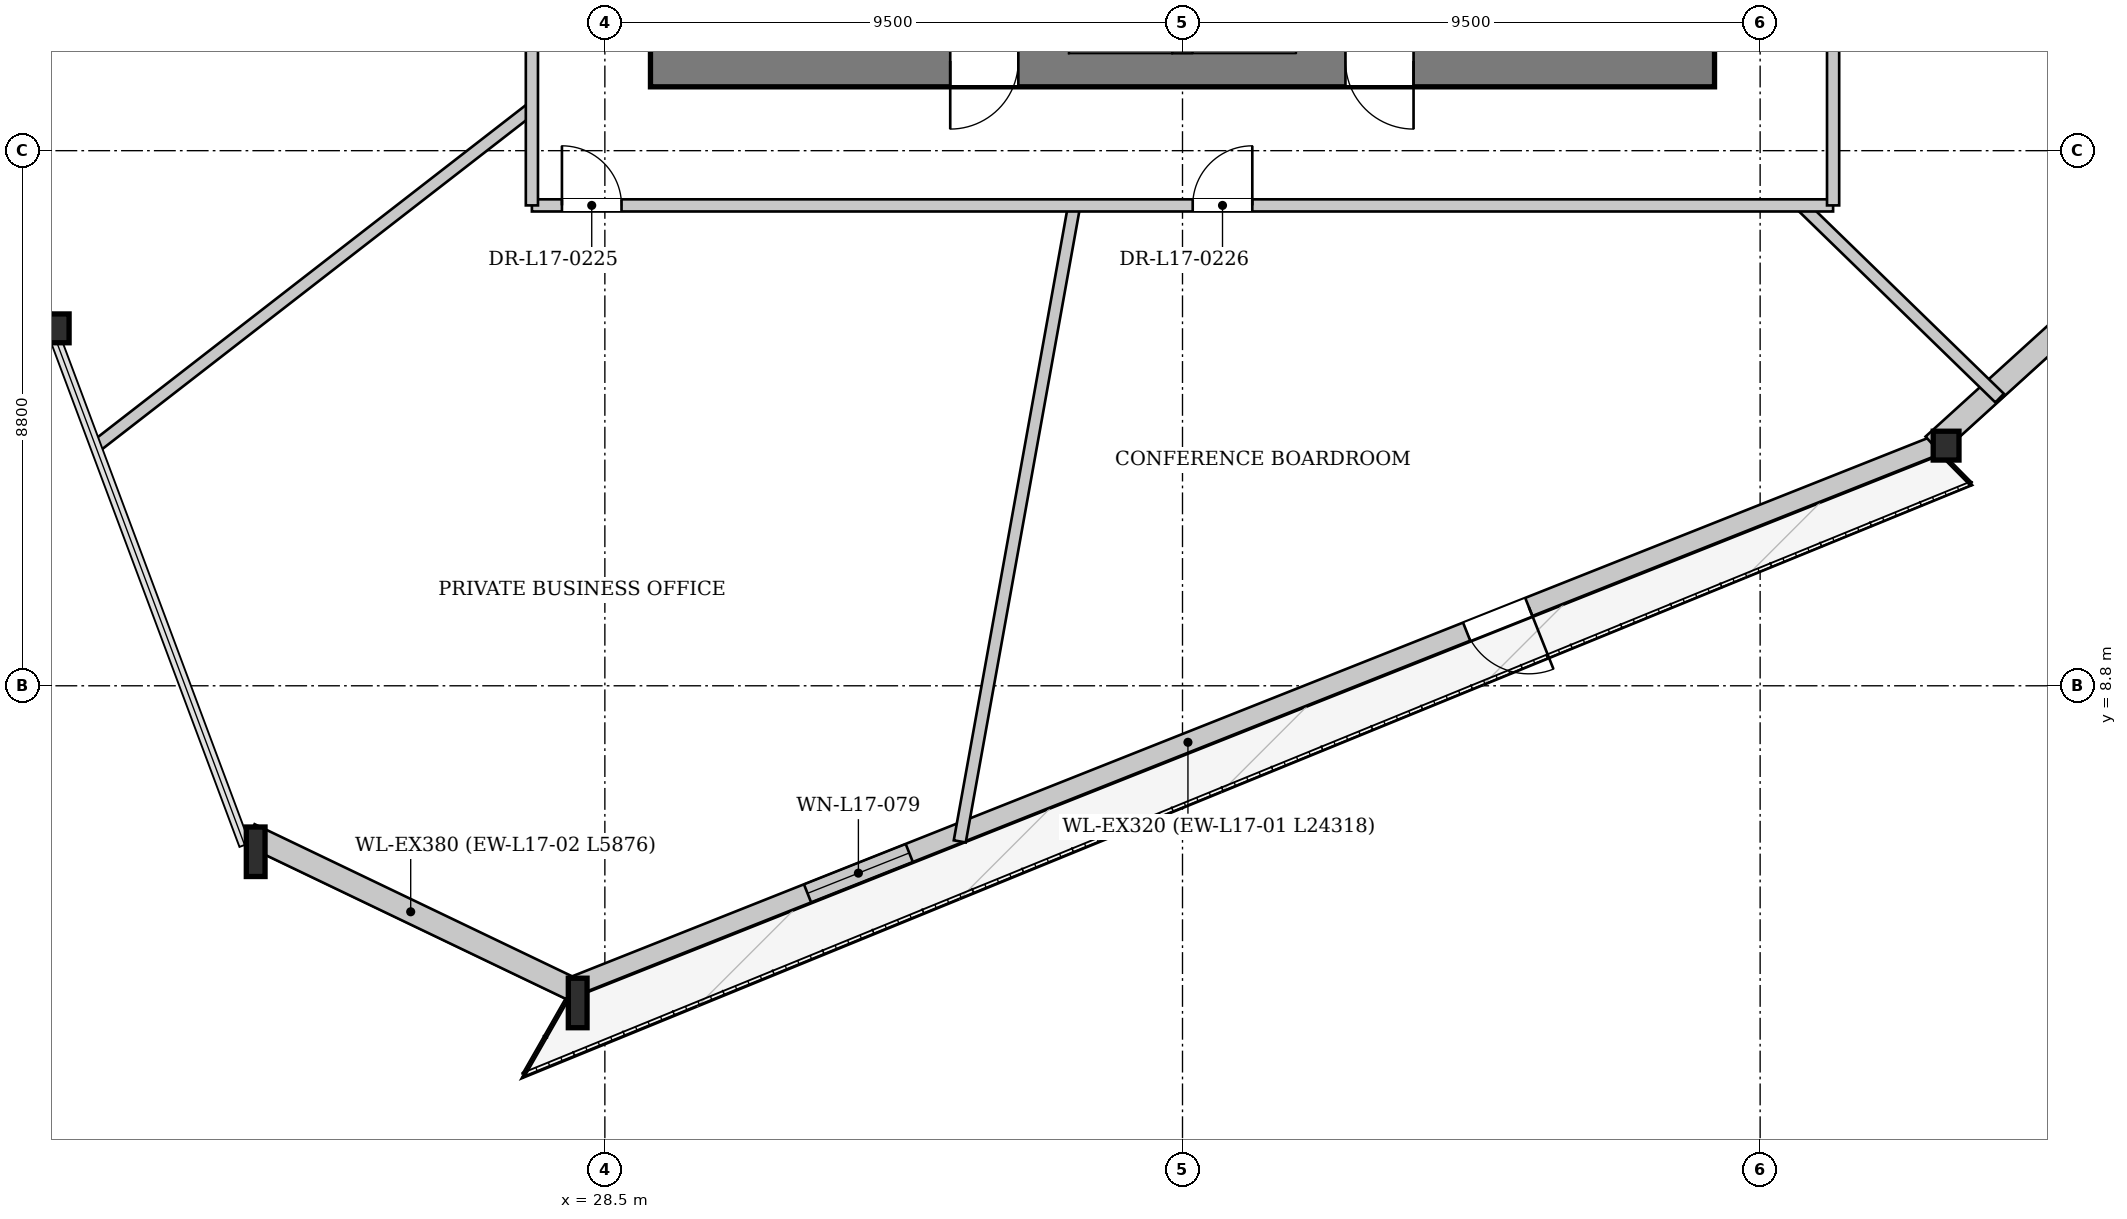
"""IFC4 building model, lengths in metres.
Left out: names, types, materials, properties, quantities, classifications, styles, units other than length and angle.
Written with IfcOpenShell. Run it as: python <this file> out.ifc"""

import sys

from ifc_helpers import new_model, si_unit, direction, frame, frame_2d, origin, origin_2d, place, context, subcontext, project, spatial, rectangle, i_section, extrude, source, transform, mapped, element, fill, save


model = new_model("IFC4")
c1 = context("Model", 3, precision=1e-05, world=origin(), true_north=direction((0.0, 1.0)))
c2 = subcontext(c1, "Body", "Model", "MODEL_VIEW")
j1 = project(units=[si_unit("LENGTHUNIT", "METRE"), si_unit("PLANEANGLEUNIT", "RADIAN")], contexts=[c1])
p1 = place(None, origin())
s1 = spatial("IfcSite", under=j1, at=p1, CompositionType="ELEMENT")
p2 = place(p1, origin())
s2 = spatial("IfcBuilding", under=s1, at=p2, CompositionType="ELEMENT")
p3 = place(p2, frame((0.0, 0.0, 68.35)))
s3 = spatial("IfcBuildingStorey", under=s2, at=p3, CompositionType="ELEMENT", Elevation=68.35)
m1 = source(origin(), c2, "Body", "SweptSolid", [
    extrude(i_section(OverallWidth=0.424, OverallDepth=0.474, WebThickness=0.043, FlangeThickness=0.068, at=origin_2d()), origin(), (0.0, 0.0, 1.0), 3.406),
])
p4 = place(p3, frame((19.349, 14.816, 0.0), z_axis=(0.074838217238, -0.081003051225, 0.993900270114), x_axis=(0.734504329916, 0.678604000382, 0.0)))
e1 = element("IfcColumn", 1, at=p4, inside=s3, PredefinedType="COLUMN", context=c2, shape_type="MappedRepresentation", body=[
    mapped(m1, transform((0.0, 0.0, 0.0), x_axis=(1.0, 0.0, 0.0), y_axis=(0.0, 1.0, 0.0), z_axis=(0.0, 0.0, 1.0), scale=1.0)),
])
m2 = source(origin(), c2, "Body", "SweptSolid", [
    extrude(i_section(OverallWidth=0.308, OverallDepth=0.814, WebThickness=0.021, FlangeThickness=0.04, at=origin_2d()), origin(), (0.0, 0.0, 1.0), 3.412),
])
p5 = place(p3, frame((22.575, 6.182, 0.0), z_axis=(0.106834569639, -0.065188407864, 0.99213751376), x_axis=(0.52087170731, 0.853634971475, 0.0)))
e2 = element("IfcColumn", 2, at=p5, inside=s3, PredefinedType="COLUMN", context=c2, shape_type="MappedRepresentation", body=[
    mapped(m2, transform((0.0, 0.0, 0.0), x_axis=(1.0, 0.0, 0.0), y_axis=(0.0, 1.0, 0.0), z_axis=(0.0, 0.0, 1.0), scale=1.0)),
])
m3 = source(origin(), c2, "Body", "SweptSolid", [
    extrude(i_section(OverallWidth=0.308, OverallDepth=0.814, WebThickness=0.021, FlangeThickness=0.04, at=origin_2d()), origin(), (0.0, 0.0, 1.0), 3.406),
])
p6 = place(p3, frame((27.875, 3.643, 0.0), z_axis=(0.104872543217, -0.034479626307, 0.993887772864), x_axis=(0.312329102246, 0.949973963796, 0.0)))
e3 = element("IfcColumn", 3, at=p6, inside=s3, PredefinedType="COLUMN", context=c2, shape_type="MappedRepresentation", body=[
    mapped(m3, transform((0.0, 0.0, 0.0), x_axis=(1.0, 0.0, 0.0), y_axis=(0.0, 1.0, 0.0), z_axis=(0.0, 0.0, 1.0), scale=1.0)),
])
m4 = source(origin(), c2, "Body", "SweptSolid", [
    extrude(i_section(OverallWidth=0.424, OverallDepth=0.474, WebThickness=0.043, FlangeThickness=0.068, at=origin_2d()), origin(), (0.0, 0.0, 1.0), 3.399),
])
p7 = place(p3, frame((50.476, 12.617, 0.0), z_axis=(0.048621314861, 0.077995196364, 0.995767401096), x_axis=(-0.848612326761, 0.529015235007, 0.0)))
e4 = element("IfcColumn", 4, at=p7, inside=s3, PredefinedType="COLUMN", context=c2, shape_type="MappedRepresentation", body=[
    mapped(m4, transform((0.0, 0.0, 0.0), x_axis=(1.0, 0.0, 0.0), y_axis=(0.0, 1.0, 0.0), z_axis=(0.0, 0.0, 1.0), scale=1.0)),
])
p8 = place(p3, frame((50.417, 12.765, 0.0), z_axis=(0.0, 0.0, 1.0), x_axis=(-0.929420161731, -0.369023255322, 0.0)))
e5 = element("IfcWall", 5, at=p8, inside=s3, PredefinedType="SOLIDWALL", context=c2, shape_type="SweptSolid", body=[
    extrude(rectangle(XDim=24.318, YDim=0.32, at=frame_2d((12.159, 0.0))), origin(), (0.0, 0.0, 1.0), 2.592),
])
p9 = place(p8, frame((7.232, 0.0, 0.0)))
e6 = element("IfcOpeningElement", 6, at=p9, cuts=e5, PredefinedType="OPENING", context=c2, shape_type="SweptSolid", body=[
    extrude(rectangle(XDim=1.1, YDim=2.3, at=frame_2d((0.55, 1.15))), frame((0.0, 0.17, 0.0), z_axis=(0.0, -1.0, 0.0), x_axis=(1.0, 0.0, 0.0)), (0.0, 0.0, 1.0), 0.34),
])
p10 = place(p8, frame((18.195, 0.0, 0.272)))
e7 = element("IfcOpeningElement", 7, at=p10, cuts=e5, PredefinedType="OPENING", context=c2, shape_type="SweptSolid", body=[
    extrude(rectangle(XDim=1.8, YDim=2.2, at=frame_2d((0.9, 1.1))), frame((0.0, 0.17, 0.0), z_axis=(0.0, -1.0, 0.0), x_axis=(1.0, 0.0, 0.0)), (0.0, 0.0, 1.0), 0.34),
])
p11 = place(p3, frame((27.957, 3.814, 0.0), z_axis=(0.0, 0.0, 1.0), x_axis=(-0.901836602669, 0.432077240879, 0.0)))
e8 = element("IfcWall", 8, at=p11, inside=s3, PredefinedType="SOLIDWALL", context=c2, shape_type="SweptSolid", body=[
    extrude(rectangle(XDim=5.876, YDim=0.38, at=frame_2d((2.938, 0.0))), origin(), (0.0, 0.0, 1.0), 2.592),
])
p12 = place(p3, frame((68.351, 29.106, 0.0), z_axis=(0.0, 0.0, 1.0), x_axis=(-0.740297486448, -0.672279429671, 0.0)))
e9 = element("IfcWall", 9, at=p12, inside=s3, PredefinedType="SOLIDWALL", context=c2, shape_type="SweptSolid", body=[
    extrude(rectangle(XDim=24.318, YDim=0.38, at=frame_2d((12.159, 0.0))), origin(), (0.0, 0.0, 1.0), 2.592),
])
p13 = place(p12, frame((5.709, 0.0, 0.222)))
e10 = element("IfcOpeningElement", 10, at=p13, cuts=e9, PredefinedType="OPENING", context=c2, shape_type="SweptSolid", body=[
    extrude(rectangle(XDim=2.2, YDim=2.25, at=frame_2d((1.1, 1.125))), frame((0.0, 0.2, 0.0), z_axis=(0.0, -1.0, 0.0), x_axis=(1.0, 0.0, 0.0)), (0.0, 0.0, 1.0), 0.4),
])
p14 = place(p12, frame((16.409, 0.0, 0.222)))
e11 = element("IfcOpeningElement", 11, at=p14, cuts=e9, PredefinedType="OPENING", context=c2, shape_type="SweptSolid", body=[
    extrude(rectangle(XDim=2.2, YDim=2.25, at=frame_2d((1.1, 1.125))), frame((0.0, 0.2, 0.0), z_axis=(0.0, -1.0, 0.0), x_axis=(1.0, 0.0, 0.0)), (0.0, 0.0, 1.0), 0.4),
])
p15 = place(p3, frame((46.75, 19.075, 0.0), z_axis=(0.0, 0.0, 1.0), x_axis=(-1.0, 0.0, 0.0)))
e12 = element("IfcWall", 12, at=p15, inside=s3, PredefinedType="SHEAR", context=c2, shape_type="SweptSolid", body=[
    extrude(rectangle(XDim=17.5, YDim=0.85, at=frame_2d((8.75, 0.0))), origin(), (0.0, 0.0, 1.0), 3.3),
])
p16 = place(p15, frame((4.95, 0.0, 0.0)))
e13 = element("IfcOpeningElement", 13, at=p16, cuts=e12, PredefinedType="OPENING", context=c2, shape_type="SweptSolid", body=[
    extrude(rectangle(XDim=1.12, YDim=2.25, at=frame_2d((0.56, 1.125))), frame((0.0, 0.435, 0.0), z_axis=(0.0, -1.0, 0.0), x_axis=(1.0, 0.0, 0.0)), (0.0, 0.0, 1.0), 0.87),
])
p17 = place(p15, frame((11.45, 0.0, 0.0)))
e14 = element("IfcOpeningElement", 14, at=p17, cuts=e12, PredefinedType="OPENING", context=c2, shape_type="SweptSolid", body=[
    extrude(rectangle(XDim=1.12, YDim=2.25, at=frame_2d((0.56, 1.125))), frame((0.0, 0.435, 0.0), z_axis=(0.0, -1.0, 0.0), x_axis=(1.0, 0.0, 0.0)), (0.0, 0.0, 1.0), 0.87),
])
p18 = place(p3, frame((27.3, 18.3, 0.0), z_axis=(0.0, 0.0, 1.0), x_axis=(-0.790147791411, -0.612916362752, 0.0)))
e15 = element("IfcWall", 15, at=p18, inside=s3, PredefinedType="PARTITIONING", context=c2, shape_type="SweptSolid", body=[
    extrude(rectangle(XDim=9.048, YDim=0.2, at=frame_2d((4.524, 0.0))), origin(), (0.0, 0.0, 1.0), 3.3),
])
p19 = place(p3, frame((36.219, 16.7, 0.0), z_axis=(0.0, 0.0, 1.0), x_axis=(-0.177081788968, -0.984196138997, 0.0)))
e16 = element("IfcWall", 16, at=p19, inside=s3, PredefinedType="PARTITIONING", context=c2, shape_type="SweptSolid", body=[
    extrude(rectangle(XDim=10.627, YDim=0.2, at=frame_2d((5.313, 0.0))), origin(), (0.0, 0.0, 1.0), 3.3),
])
p20 = place(p3, frame((48.18, 16.7, 0.0), z_axis=(0.0, 0.0, 1.0), x_axis=(0.716921827567, -0.697153564976, 0.0)))
e17 = element("IfcWall", 17, at=p20, inside=s3, PredefinedType="PARTITIONING", context=c2, shape_type="SweptSolid", body=[
    extrude(rectangle(XDim=4.545, YDim=0.2, at=frame_2d((2.272, 0.0))), origin(), (0.0, 0.0, 1.0), 3.3),
])
p21 = place(p3, frame((27.3, 16.7, 0.0), z_axis=(0.0, 0.0, 1.0), x_axis=(1.0, 0.0, 0.0)))
e18 = element("IfcWall", 18, at=p21, inside=s3, PredefinedType="PARTITIONING", context=c2, shape_type="SweptSolid", body=[
    extrude(rectangle(XDim=21.4, YDim=0.2, at=frame_2d((10.7, 0.0))), origin(), (0.0, 0.0, 1.0), 3.3),
])
p22 = place(p21, frame((0.494, 0.0, 0.0)))
e19 = element("IfcOpeningElement", 19, at=p22, cuts=e18, PredefinedType="OPENING", context=c2, shape_type="SweptSolid", body=[
    extrude(rectangle(XDim=0.98, YDim=2.15, at=frame_2d((0.49, 1.075))), frame((0.0, 0.11, 0.0), z_axis=(0.0, -1.0, 0.0), x_axis=(1.0, 0.0, 0.0)), (0.0, 0.0, 1.0), 0.22),
])
p23 = place(p21, frame((10.868, 0.0, 0.0)))
e20 = element("IfcOpeningElement", 20, at=p23, cuts=e18, PredefinedType="OPENING", context=c2, shape_type="SweptSolid", body=[
    extrude(rectangle(XDim=0.98, YDim=2.15, at=frame_2d((0.49, 1.075))), frame((0.0, 0.11, 0.0), z_axis=(0.0, -1.0, 0.0), x_axis=(1.0, 0.0, 0.0)), (0.0, 0.0, 1.0), 0.22),
])
p24 = place(p3, frame((27.3, 16.7, 0.0), z_axis=(0.0, 0.0, 1.0), x_axis=(0.0, 1.0, 0.0)))
e21 = element("IfcWall", 21, at=p24, inside=s3, PredefinedType="PARTITIONING", context=c2, shape_type="SweptSolid", body=[
    extrude(rectangle(XDim=19.8, YDim=0.2, at=frame_2d((9.9, 0.0))), origin(), (0.0, 0.0, 1.0), 3.3),
])
p25 = place(p24, frame((15.13, 0.0, 0.0)))
e22 = element("IfcOpeningElement", 22, at=p25, cuts=e21, PredefinedType="OPENING", context=c2, shape_type="SweptSolid", body=[
    extrude(rectangle(XDim=0.98, YDim=2.15, at=frame_2d((0.49, 1.075))), frame((0.0, 0.11, 0.0), z_axis=(0.0, -1.0, 0.0), x_axis=(1.0, 0.0, 0.0)), (0.0, 0.0, 1.0), 0.22),
])
p26 = place(p24, frame((3.667, 0.0, 0.0)))
e23 = element("IfcOpeningElement", 23, at=p26, cuts=e21, PredefinedType="OPENING", context=c2, shape_type="SweptSolid", body=[
    extrude(rectangle(XDim=0.98, YDim=2.15, at=frame_2d((0.49, 1.075))), frame((0.0, 0.11, 0.0), z_axis=(0.0, -1.0, 0.0), x_axis=(1.0, 0.0, 0.0)), (0.0, 0.0, 1.0), 0.22),
])
p27 = place(p3, frame((48.7, 16.7, 0.0), z_axis=(0.0, 0.0, 1.0), x_axis=(0.0, 1.0, 0.0)))
e24 = element("IfcWall", 24, at=p27, inside=s3, PredefinedType="PARTITIONING", context=c2, shape_type="SweptSolid", body=[
    extrude(rectangle(XDim=19.8, YDim=0.2, at=frame_2d((9.9, 0.0))), origin(), (0.0, 0.0, 1.0), 3.3),
])
p28 = place(p27, frame((4.413, 0.0, 0.0)))
e25 = element("IfcOpeningElement", 25, at=p28, cuts=e24, PredefinedType="OPENING", context=c2, shape_type="SweptSolid", body=[
    extrude(rectangle(XDim=0.98, YDim=2.15, at=frame_2d((0.49, 1.075))), frame((0.0, 0.11, 0.0), z_axis=(0.0, -1.0, 0.0), x_axis=(1.0, 0.0, 0.0)), (0.0, 0.0, 1.0), 0.22),
])
m5 = source(origin(), c2, "Body", "SweptSolid", [
    extrude(rectangle(XDim=1.1, YDim=2.3, at=frame_2d((0.55, 1.15))), frame((0.0, 0.025, 0.0), z_axis=(0.0, -1.0, 0.0), x_axis=(1.0, 0.0, 0.0)), (0.0, 0.0, 1.0), 0.05),
])
p29 = place(p9, origin())
e26 = element("IfcDoor", 26, at=p29, inside=s3, OperationType="SINGLE_SWING_LEFT", PredefinedType="DOOR", context=c2, shape_type="MappedRepresentation", body=[
    mapped(m5, transform((0.0, 0.0, 0.0), x_axis=(1.0, 0.0, 0.0), y_axis=(0.0, 1.0, 0.0), z_axis=(0.0, 0.0, 1.0), scale=1.0)),
])
fill(e6, e26)
m6 = source(origin(), c2, "Body", "SweptSolid", [
    extrude(rectangle(XDim=1.8, YDim=2.2, at=frame_2d((0.9, 1.1))), frame((0.0, 0.03, 0.0), z_axis=(0.0, -1.0, 0.0), x_axis=(1.0, 0.0, 0.0)), (0.0, 0.0, 1.0), 0.06),
])
p30 = place(p10, origin())
e27 = element("IfcWindow", 27, at=p30, inside=s3, PartitioningType="SINGLE_PANEL", PredefinedType="WINDOW", context=c2, shape_type="MappedRepresentation", body=[
    mapped(m6, transform((0.0, 0.0, 0.0), x_axis=(1.0, 0.0, 0.0), y_axis=(0.0, 1.0, 0.0), z_axis=(0.0, 0.0, 1.0), scale=1.0)),
])
fill(e7, e27)
m7 = source(origin(), c2, "Body", "SweptSolid", [
    extrude(rectangle(XDim=1.12, YDim=2.25, at=frame_2d((0.56, 1.125))), frame((0.0, 0.025, 0.0), z_axis=(0.0, -1.0, 0.0), x_axis=(1.0, 0.0, 0.0)), (0.0, 0.0, 1.0), 0.05),
])
p31 = place(p16, origin())
e28 = element("IfcDoor", 28, at=p31, inside=s3, OperationType="SINGLE_SWING_LEFT", PredefinedType="DOOR", context=c2, shape_type="MappedRepresentation", body=[
    mapped(m7, transform((0.0, 0.0, 0.0), x_axis=(1.0, 0.0, 0.0), y_axis=(0.0, 1.0, 0.0), z_axis=(0.0, 0.0, 1.0), scale=1.0)),
])
fill(e13, e28)
p32 = place(p17, origin())
e29 = element("IfcDoor", 29, at=p32, inside=s3, OperationType="SINGLE_SWING_RIGHT", PredefinedType="DOOR", context=c2, shape_type="MappedRepresentation", body=[
    mapped(m7, transform((0.0, 0.0, 0.0), x_axis=(1.0, 0.0, 0.0), y_axis=(0.0, 1.0, 0.0), z_axis=(0.0, 0.0, 1.0), scale=1.0)),
])
fill(e14, e29)
m8 = source(origin(), c2, "Body", "SweptSolid", [
    extrude(rectangle(XDim=0.98, YDim=2.15, at=frame_2d((0.49, 1.075))), frame((0.0, 0.025, 0.0), z_axis=(0.0, -1.0, 0.0), x_axis=(1.0, 0.0, 0.0)), (0.0, 0.0, 1.0), 0.05),
])
p33 = place(p22, origin())
e30 = element("IfcDoor", 30, at=p33, inside=s3, OperationType="SINGLE_SWING_LEFT", PredefinedType="DOOR", context=c2, shape_type="MappedRepresentation", body=[
    mapped(m8, transform((0.0, 0.0, 0.0), x_axis=(1.0, 0.0, 0.0), y_axis=(0.0, 1.0, 0.0), z_axis=(0.0, 0.0, 1.0), scale=1.0)),
])
fill(e19, e30)
p34 = place(p23, origin())
e31 = element("IfcDoor", 31, at=p34, inside=s3, OperationType="SINGLE_SWING_RIGHT", PredefinedType="DOOR", context=c2, shape_type="MappedRepresentation", body=[
    mapped(m8, transform((0.0, 0.0, 0.0), x_axis=(1.0, 0.0, 0.0), y_axis=(0.0, 1.0, 0.0), z_axis=(0.0, 0.0, 1.0), scale=1.0)),
])
fill(e20, e31)
save(model, sys.argv[1])
